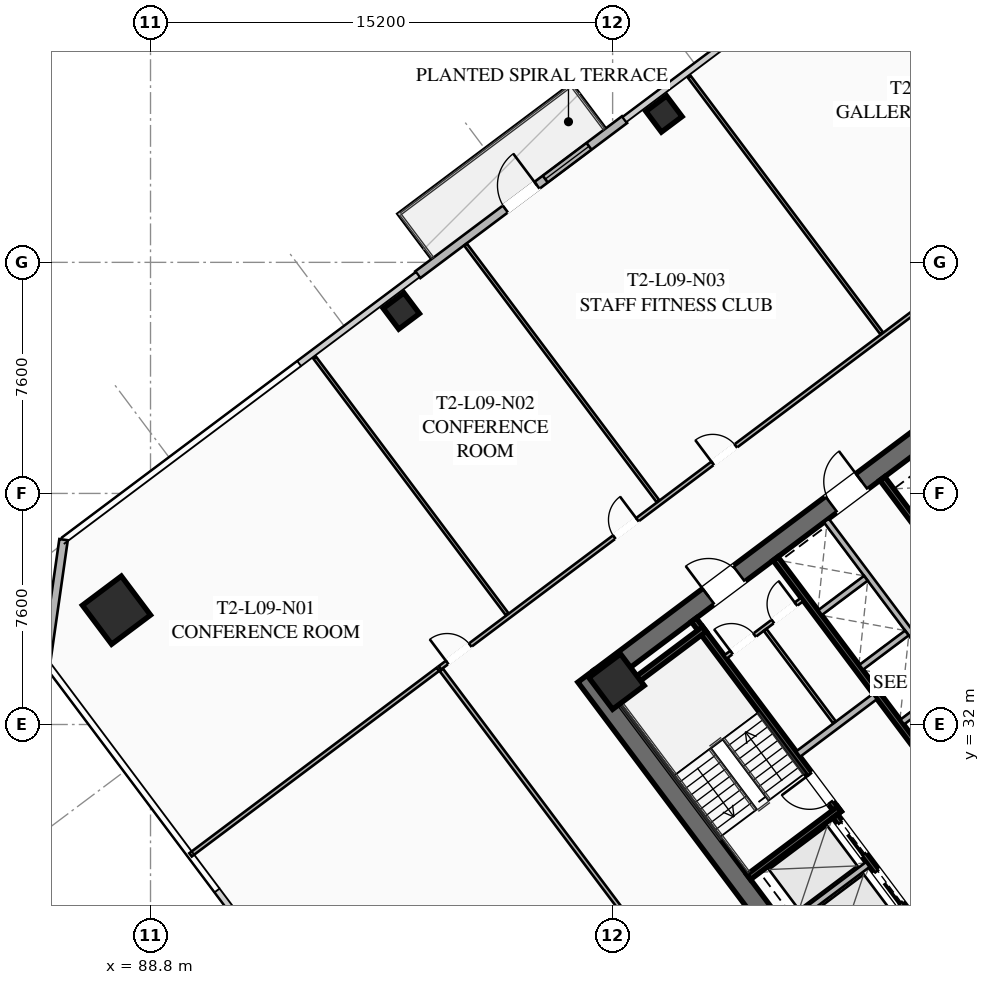
"""IFC4 building model, lengths in metres.
Left out: names, types, materials, properties, quantities, classifications, styles, units other than length and angle.
Written with IfcOpenShell. Run it as: python <this file> out.ifc"""

import sys

from ifc_helpers import new_model, si_unit, direction, frame, frame_2d, origin, origin_2d, place, context, subcontext, project, spatial, rectangle, hollow_rectangle, extrude, element, fill, save


model = new_model("IFC4")
c1 = context("Model", 3, precision=1e-05, world=origin(), true_north=direction((0.0, 1.0)))
c2 = subcontext(c1, "Body", "Model", "MODEL_VIEW")
j1 = project(units=[si_unit("LENGTHUNIT", "METRE"), si_unit("PLANEANGLEUNIT", "RADIAN")], contexts=[c1])
p1 = place(None, origin())
s1 = spatial("IfcSite", under=j1, at=p1, CompositionType="ELEMENT")
p2 = place(p1, origin())
s2 = spatial("IfcBuilding", under=s1, at=p2, CompositionType="ELEMENT")
p3 = place(p2, frame((0.0, 0.0, 38.8)))
s3 = spatial("IfcBuildingStorey", under=s2, at=p3, CompositionType="ELEMENT", Elevation=38.8)
p4 = place(p3, frame((112.476, 21.107, 0.0), z_axis=(0.0, 0.0, 1.0), x_axis=(-0.600005007985, 0.799996243986, 0.0)))
e1 = element("IfcWall", 1, at=p4, inside=s3, PredefinedType="SHEAR", context=c2, shape_type="SweptSolid", body=[
    extrude(rectangle(XDim=15.6, YDim=0.65, at=frame_2d((7.8, 0.0))), origin(), (0.0, 0.0, 1.0), 3.55),
])
p5 = place(p3, frame((124.429, 30.478, 0.0), z_axis=(0.0, 0.0, 1.0), x_axis=(-0.799998028465, -0.600002628705, 0.0)))
e2 = element("IfcWall", 2, at=p5, inside=s3, PredefinedType="SHEAR", context=c2, shape_type="SweptSolid", body=[
    extrude(rectangle(XDim=14.86, YDim=0.65, at=frame_2d((7.43, 0.0))), origin(), (0.0, 0.0, 1.0), 3.55),
])
p6 = place(p5, frame((9.13, 0.0, 0.0)))
e3 = element("IfcOpeningElement", 3, at=p6, cuts=e2, PredefinedType="OPENING", context=c2, shape_type="SweptSolid", body=[
    extrude(rectangle(XDim=1.25, YDim=2.25, at=frame_2d((0.625, 1.125))), frame((0.0, 0.335, 0.0), z_axis=(0.0, -1.0, 0.0), x_axis=(1.0, 0.0, 0.0)), (0.0, 0.0, 1.0), 0.67),
])
p7 = place(p5, frame((4.08, 0.0, 0.0)))
e4 = element("IfcOpeningElement", 4, at=p7, cuts=e2, PredefinedType="OPENING", context=c2, shape_type="SweptSolid", body=[
    extrude(rectangle(XDim=1.25, YDim=2.25, at=frame_2d((0.625, 1.125))), frame((0.0, 0.335, 0.0), z_axis=(0.0, -1.0, 0.0), x_axis=(1.0, 0.0, 0.0)), (0.0, 0.0, 1.0), 0.67),
])
p8 = place(p3, frame((103.571, 33.522, 0.0), z_axis=(0.0, 0.0, 1.0), x_axis=(0.799998028465, 0.600002628705, 0.0)))
e5 = element("IfcWall", 5, at=p8, inside=s3, PredefinedType="SHEAR", context=c2, shape_type="SweptSolid", body=[
    extrude(rectangle(XDim=14.86, YDim=0.65, at=frame_2d((7.43, 0.0))), origin(), (0.0, 0.0, 1.0), 3.55),
])
p9 = place(p8, frame((4.48, 0.0, 0.0)))
e6 = element("IfcOpeningElement", 6, at=p9, cuts=e5, PredefinedType="OPENING", context=c2, shape_type="SweptSolid", body=[
    extrude(rectangle(XDim=1.25, YDim=2.25, at=frame_2d((0.625, 1.125))), frame((0.0, 0.335, 0.0), z_axis=(0.0, -1.0, 0.0), x_axis=(1.0, 0.0, 0.0)), (0.0, 0.0, 1.0), 0.67),
])
p10 = place(p8, frame((9.53, 0.0, 0.0)))
e7 = element("IfcOpeningElement", 7, at=p10, cuts=e5, PredefinedType="OPENING", context=c2, shape_type="SweptSolid", body=[
    extrude(rectangle(XDim=1.25, YDim=2.25, at=frame_2d((0.625, 1.125))), frame((0.0, 0.335, 0.0), z_axis=(0.0, -1.0, 0.0), x_axis=(1.0, 0.0, 0.0)), (0.0, 0.0, 1.0), 0.67),
])
p11 = place(p3, frame((104.13, 33.41, 0.0), z_axis=(0.0, 0.0, 1.0), x_axis=(0.799999996291, 0.600000004945, 0.0)))
e8 = element("IfcColumn", 8, at=p11, inside=s3, PredefinedType="COLUMN", context=c2, shape_type="SweptSolid", body=[
    extrude(hollow_rectangle(XDim=1.3, YDim=1.3, WallThickness=0.05, at=origin_2d()), origin(), (0.0, 0.0, 1.0), 3.35),
])
p12 = place(p3, frame((87.68, 35.76, 0.0), z_axis=(0.0, 0.0, 1.0), x_axis=(0.799999996291, 0.600000004945, 0.0)))
e9 = element("IfcColumn", 9, at=p12, inside=s3, PredefinedType="COLUMN", context=c2, shape_type="SweptSolid", body=[
    extrude(hollow_rectangle(XDim=1.6, YDim=1.6, WallThickness=0.06, at=origin_2d()), origin(), (0.0, 0.0, 1.0), 3.35),
])
for number, where, z_axis, x_axis in (
    (10, (105.69, 52.08, 0.0), (0.0, 0.0, 1.0), (0.8, 0.6, 0.0)),
    (11, (97.05, 45.6, 0.0), (0.0, 0.0, 1.0), (0.8, 0.6, 0.0)),
):
    element("IfcColumn", number, at=place(p3, frame(where, z_axis=z_axis, x_axis=x_axis)), inside=s3, PredefinedType="COLUMN", context=c2, shape_type="SweptSolid", body=[
        extrude(hollow_rectangle(XDim=0.85, YDim=0.85, WallThickness=0.035, at=origin_2d()), origin(), (0.0, 0.0, 1.0), 3.35),
    ])
p13 = place(p3, frame((97.592, 46.794, 0.0), z_axis=(0.0, 0.0, 1.0), x_axis=(0.799996553335, 0.600004595526, 0.0)))
e12 = element("IfcWall", 12, at=p13, inside=s3, PredefinedType="SOLIDWALL", context=c2, shape_type="SweptSolid", body=[
    extrude(rectangle(XDim=8.5, YDim=0.28, at=frame_2d((4.25, 0.0))), origin(), (0.0, 0.0, 1.0), 3.35),
])
p14 = place(p13, frame((3.6, 0.0, 0.0)))
e13 = element("IfcOpeningElement", 13, at=p14, cuts=e12, PredefinedType="OPENING", context=c2, shape_type="SweptSolid", body=[
    extrude(rectangle(XDim=1.3, YDim=2.15, at=frame_2d((0.65, 1.075))), frame((0.0, 0.15, 0.0), z_axis=(0.0, -1.0, 0.0), x_axis=(1.0, 0.0, 0.0)), (0.0, 0.0, 1.0), 0.3),
])
p15 = place(p13, frame((5.24, 0.0, 0.85)))
e14 = element("IfcOpeningElement", 14, at=p15, cuts=e12, PredefinedType="OPENING", context=c2, shape_type="SweptSolid", body=[
    extrude(rectangle(XDim=1.8, YDim=1.92, at=frame_2d((0.9, 0.96))), frame((0.0, 0.15, 0.0), z_axis=(0.0, -1.0, 0.0), x_axis=(1.0, 0.0, 0.0)), (0.0, 0.0, 1.0), 0.3),
])
p16 = place(p3, frame((85.36, 34.02, 0.0), z_axis=(0.0, 0.0, 1.0), x_axis=(0.14137968631, 0.989955445613, 0.0)))
e15 = element("IfcWall", 15, at=p16, inside=s3, PredefinedType="SOLIDWALL", context=c2, shape_type="SweptSolid", body=[
    extrude(rectangle(XDim=4.101, YDim=0.28, at=frame_2d((2.051, 0.0))), origin(), (0.0, 0.0, 1.0), 3.35),
])
p17 = place(p3, frame((111.44, 29.08, 0.0), z_axis=(0.0, 0.0, 1.0), x_axis=(-0.600009827119, 0.799992629566, 0.0)))
e16 = element("IfcWall", 16, at=p17, inside=s3, PredefinedType="SHEAR", context=c2, shape_type="SweptSolid", body=[
    extrude(rectangle(XDim=7.95, YDim=0.2, at=frame_2d((3.975, 0.0))), origin(), (0.0, 0.0, 1.0), 3.35),
])
p18 = place(p17, frame((0.45, 0.0, 0.0)))
e17 = element("IfcOpeningElement", 17, at=p18, cuts=e16, PredefinedType="OPENING", context=c2, shape_type="SweptSolid", body=[
    extrude(rectangle(XDim=1.15, YDim=2.2, at=frame_2d((0.575, 1.1))), frame((0.0, 0.11, 0.0), z_axis=(0.0, -1.0, 0.0), x_axis=(1.0, 0.0, 0.0)), (0.0, 0.0, 1.0), 0.22),
])
for number, where, z_axis, x_axis in (
    (18, (108.476, 26.982, 0.0), (0.0, 0.0, 1.0), (0.8, 0.6, 0.0)),
    (19, (104.036, 32.902, 0.0), (0.0, 0.0, 1.0), (0.8, 0.6, 0.0)),
):
    element("IfcWall", number, at=place(p3, frame(where, z_axis=z_axis, x_axis=x_axis)), inside=s3, PredefinedType="SHEAR", context=c2, shape_type="SweptSolid", body=[
        extrude(rectangle(XDim=3.73, YDim=0.2, at=frame_2d((1.865, 0.0))), origin(), (0.0, 0.0, 1.0), 3.35),
    ])
p19 = place(p3, frame((117.938, 26.016, 0.0), z_axis=(0.0, 0.0, 1.0), x_axis=(-0.600005463273, 0.799995902516, 0.0)))
e20 = element("IfcWall", 20, at=p19, inside=s3, PredefinedType="SHEAR", context=c2, shape_type="SweptSolid", body=[
    extrude(rectangle(XDim=14.3, YDim=0.2, at=frame_2d((7.15, 0.0))), origin(), (0.0, 0.0, 1.0), 3.35),
])
p20 = place(p3, frame((110.104, 31.028, 0.0), z_axis=(0.0, 0.0, 1.0), x_axis=(0.800018601094, 0.59997519774, 0.0)))
e21 = element("IfcWall", 21, at=p20, inside=s3, PredefinedType="SOLIDWALL", context=c2, shape_type="SweptSolid", body=[
    extrude(rectangle(XDim=3.15, YDim=0.22, at=frame_2d((1.575, 0.0))), origin(), (0.0, 0.0, 1.0), 2.703),
])
p21 = place(p3, frame((115.13, 23.91, 0.0), z_axis=(0.0, 0.0, 1.0), x_axis=(-0.599975393228, 0.800018454488, 0.0)))
e22 = element("IfcWall", 22, at=p21, inside=s3, PredefinedType="SHEAR", context=c2, shape_type="SweptSolid", body=[
    extrude(rectangle(XDim=6.35, YDim=0.2, at=frame_2d((3.175, 0.0))), origin(), (0.0, 0.0, 1.0), 3.35),
])
p22 = place(p21, frame((4.775, 0.0, 0.0)))
e23 = element("IfcOpeningElement", 23, at=p22, cuts=e22, PredefinedType="OPENING", context=c2, shape_type="SweptSolid", body=[
    extrude(rectangle(XDim=1.3, YDim=2.25, at=frame_2d((0.65, 1.125))), frame((0.0, 0.11, 0.0), z_axis=(0.0, -1.0, 0.0), x_axis=(1.0, 0.0, 0.0)), (0.0, 0.0, 1.0), 0.22),
])
p23 = place(p21, frame((2.775, 0.0, 0.0)))
e24 = element("IfcOpeningElement", 24, at=p23, cuts=e22, PredefinedType="OPENING", context=c2, shape_type="SweptSolid", body=[
    extrude(rectangle(XDim=1.3, YDim=2.25, at=frame_2d((0.65, 1.125))), frame((0.0, 0.11, 0.0), z_axis=(0.0, -1.0, 0.0), x_axis=(1.0, 0.0, 0.0)), (0.0, 0.0, 1.0), 0.22),
])
p24 = place(p21, frame((0.575, 0.0, 0.0)))
e25 = element("IfcOpeningElement", 25, at=p24, cuts=e22, PredefinedType="OPENING", context=c2, shape_type="SweptSolid", body=[
    extrude(rectangle(XDim=1.3, YDim=2.25, at=frame_2d((0.65, 1.125))), frame((0.0, 0.11, 0.0), z_axis=(0.0, -1.0, 0.0), x_axis=(1.0, 0.0, 0.0)), (0.0, 0.0, 1.0), 0.22),
])
p25 = place(p3, frame((109.688, 25.366, 0.0), z_axis=(0.0, 0.0, 1.0), x_axis=(0.8, 0.6, 0.0)))
e26 = element("IfcWall", 26, at=p25, inside=s3, PredefinedType="SOLIDWALL", context=c2, shape_type="SweptSolid", body=[
    extrude(rectangle(XDim=3.38, YDim=0.2, at=frame_2d((1.69, 0.0))), origin(), (0.0, 0.0, 1.0), 3.35),
])
p26 = place(p3, frame((112.87, 40.09, 0.0), z_axis=(0.0, 0.0, 1.0), x_axis=(0.599975393228, -0.800018454488, 0.0)))
e27 = element("IfcWall", 27, at=p26, inside=s3, PredefinedType="SHEAR", context=c2, shape_type="SweptSolid", body=[
    extrude(rectangle(XDim=6.35, YDim=0.2, at=frame_2d((3.175, 0.0))), origin(), (0.0, 0.0, 1.0), 3.35),
])
p27 = place(p3, frame((107.71, 34.22, 0.0), z_axis=(0.0, 0.0, 1.0), x_axis=(0.799981399002, 0.60002480053, 0.0)))
e28 = element("IfcWall", 28, at=p27, inside=s3, PredefinedType="PARTITIONING", context=c2, shape_type="SweptSolid", body=[
    extrude(rectangle(XDim=3.15, YDim=0.135, at=frame_2d((1.575, 0.0))), origin(), (0.0, 0.0, 1.0), 2.703),
])
p28 = place(p27, frame((0.25, 0.0, 0.0)))
e29 = element("IfcOpeningElement", 29, at=p28, cuts=e28, PredefinedType="OPENING", context=c2, shape_type="SweptSolid", body=[
    extrude(rectangle(XDim=0.95, YDim=2.05, at=frame_2d((0.475, 1.025))), frame((0.0, 0.077, 0.0), z_axis=(0.0, -1.0, 0.0), x_axis=(1.0, 0.0, 0.0)), (0.0, 0.0, 1.0), 0.155),
])
p29 = place(p27, frame((1.95, 0.0, 0.0)))
e30 = element("IfcOpeningElement", 30, at=p29, cuts=e28, PredefinedType="OPENING", context=c2, shape_type="SweptSolid", body=[
    extrude(rectangle(XDim=0.95, YDim=2.05, at=frame_2d((0.475, 1.025))), frame((0.0, 0.077, 0.0), z_axis=(0.0, -1.0, 0.0), x_axis=(1.0, 0.0, 0.0)), (0.0, 0.0, 1.0), 0.155),
])
p30 = place(p3, frame((111.296, 32.072, 0.0), z_axis=(0.0, 0.0, 1.0), x_axis=(-0.59995887973, 0.800030838552, 0.0)))
e31 = element("IfcWall", 31, at=p30, inside=s3, PredefinedType="PARTITIONING", context=c2, shape_type="SweptSolid", body=[
    extrude(rectangle(XDim=3.8, YDim=0.11, at=frame_2d((1.9, 0.0))), origin(), (0.0, 0.0, 1.0), 2.703),
])
p31 = place(p3, frame((115.11, 33.27, 0.0), z_axis=(0.0, 0.0, 1.0), x_axis=(-0.600011488909, 0.79999138319, 0.0)))
e32 = element("IfcWall", 32, at=p31, inside=s3, PredefinedType="SOLIDWALL", context=c2, shape_type="SweptSolid", body=[
    extrude(rectangle(XDim=6.8, YDim=0.2, at=frame_2d((3.4, 0.0))), origin(), (0.0, 0.0, 1.0), 3.35),
])
p32 = place(p3, frame((113.526, 32.082, 0.0), z_axis=(0.0, 0.0, 1.0), x_axis=(0.800046745961, 0.599937666993, 0.0)))
e33 = element("IfcWall", 33, at=p32, inside=s3, PredefinedType="SOLIDWALL", context=c2, shape_type="SweptSolid", body=[
    extrude(rectangle(XDim=1.88, YDim=0.2, at=frame_2d((0.94, 0.0))), origin(), (0.0, 0.0, 1.0), 3.35),
])
p33 = place(p3, frame((112.176, 33.882, 0.0), z_axis=(0.0, 0.0, 1.0), x_axis=(0.8, 0.6, 0.0)))
e34 = element("IfcWall", 34, at=p33, inside=s3, PredefinedType="SOLIDWALL", context=c2, shape_type="SweptSolid", body=[
    extrude(rectangle(XDim=1.88, YDim=0.2, at=frame_2d((0.94, 0.0))), origin(), (0.0, 0.0, 1.0), 3.35),
])
p34 = place(p3, frame((110.826, 35.682, 0.0), z_axis=(0.0, 0.0, 1.0), x_axis=(0.799984418148, 0.600020775241, 0.0)))
e35 = element("IfcWall", 35, at=p34, inside=s3, PredefinedType="SOLIDWALL", context=c2, shape_type="SweptSolid", body=[
    extrude(rectangle(XDim=1.88, YDim=0.2, at=frame_2d((0.94, 0.0))), origin(), (0.0, 0.0, 1.0), 3.35),
])
p35 = place(p3, frame((98.316, 33.862, 0.0), z_axis=(0.0, 0.0, 1.0), x_axis=(0.800001947934, 0.599997402746, 0.0)))
e36 = element("IfcWall", 36, at=p35, inside=s3, PredefinedType="PARTITIONING", context=c2, shape_type="SweptSolid", body=[
    extrude(rectangle(XDim=30.08, YDim=0.135, at=frame_2d((15.04, 0.0))), origin(), (0.0, 0.0, 1.0), 2.703),
])
p36 = place(p35, frame((0.3, 0.0, 0.0)))
e37 = element("IfcOpeningElement", 37, at=p36, cuts=e36, PredefinedType="OPENING", context=c2, shape_type="SweptSolid", body=[
    extrude(rectangle(XDim=0.95, YDim=2.05, at=frame_2d((0.475, 1.025))), frame((0.0, 0.077, 0.0), z_axis=(0.0, -1.0, 0.0), x_axis=(1.0, 0.0, 0.0)), (0.0, 0.0, 1.0), 0.155),
])
p37 = place(p35, frame((7.172, 0.0, 0.0)))
e38 = element("IfcOpeningElement", 38, at=p37, cuts=e36, PredefinedType="OPENING", context=c2, shape_type="SweptSolid", body=[
    extrude(rectangle(XDim=0.95, YDim=2.05, at=frame_2d((0.475, 1.025))), frame((0.0, 0.077, 0.0), z_axis=(0.0, -1.0, 0.0), x_axis=(1.0, 0.0, 0.0)), (0.0, 0.0, 1.0), 0.155),
])
p38 = place(p35, frame((11.218, 0.0, 0.0)))
e39 = element("IfcOpeningElement", 39, at=p38, cuts=e36, PredefinedType="OPENING", context=c2, shape_type="SweptSolid", body=[
    extrude(rectangle(XDim=0.95, YDim=2.05, at=frame_2d((0.475, 1.025))), frame((0.0, 0.077, 0.0), z_axis=(0.0, -1.0, 0.0), x_axis=(1.0, 0.0, 0.0)), (0.0, 0.0, 1.0), 0.155),
])
p39 = place(p35, frame((28.83, 0.0, 0.0)))
e40 = element("IfcOpeningElement", 40, at=p39, cuts=e36, PredefinedType="OPENING", context=c2, shape_type="SweptSolid", body=[
    extrude(rectangle(XDim=0.95, YDim=2.05, at=frame_2d((0.475, 1.025))), frame((0.0, 0.077, 0.0), z_axis=(0.0, -1.0, 0.0), x_axis=(1.0, 0.0, 0.0)), (0.0, 0.0, 1.0), 0.155),
])
p40 = place(p3, frame((100.532, 35.624, 0.0), z_axis=(0.0, 0.0, 1.0), x_axis=(-0.600007405188, 0.799994446056, 0.0)))
e41 = element("IfcWall", 41, at=p40, inside=s3, PredefinedType="PARTITIONING", context=c2, shape_type="SweptSolid", body=[
    extrude(rectangle(XDim=10.55, YDim=0.11, at=frame_2d((5.275, 0.0))), origin(), (0.0, 0.0, 1.0), 2.703),
])
p41 = place(p3, frame((105.492, 39.344, 0.0), z_axis=(0.0, 0.0, 1.0), x_axis=(-0.599992594658, 0.800005553953, 0.0)))
e42 = element("IfcWall", 42, at=p41, inside=s3, PredefinedType="PARTITIONING", context=c2, shape_type="SweptSolid", body=[
    extrude(rectangle(XDim=10.55, YDim=0.11, at=frame_2d((5.275, 0.0))), origin(), (0.0, 0.0, 1.0), 2.703),
])
p42 = place(p3, frame((112.852, 44.864, 0.0), z_axis=(0.0, 0.0, 1.0), x_axis=(-0.600007405188, 0.799994446056, 0.0)))
e43 = element("IfcWall", 43, at=p42, inside=s3, PredefinedType="PARTITIONING", context=c2, shape_type="SweptSolid", body=[
    extrude(rectangle(XDim=10.55, YDim=0.11, at=frame_2d((5.275, 0.0))), origin(), (0.0, 0.0, 1.0), 2.703),
])
p43 = place(p3, frame((135.55, 34.35, 0.0), z_axis=(0.0, 0.0, 1.0), x_axis=(-0.799998052067, -0.600002597235, 0.0)))
e44 = element("IfcWall", 44, at=p43, inside=s3, PredefinedType="PARTITIONING", context=c2, shape_type="SweptSolid", body=[
    extrude(rectangle(XDim=30.08, YDim=0.135, at=frame_2d((15.04, 0.0))), origin(), (0.0, 0.0, 1.0), 2.703),
])
p44 = place(p43, frame((28.75, 0.0, 0.0)))
e45 = element("IfcOpeningElement", 45, at=p44, cuts=e44, PredefinedType="OPENING", context=c2, shape_type="SweptSolid", body=[
    extrude(rectangle(XDim=0.95, YDim=2.05, at=frame_2d((0.475, 1.025))), frame((0.0, 0.077, 0.0), z_axis=(0.0, -1.0, 0.0), x_axis=(1.0, 0.0, 0.0)), (0.0, 0.0, 1.0), 0.155),
])
p45 = place(p43, frame((21.999, 0.0, 0.0)))
e46 = element("IfcOpeningElement", 46, at=p45, cuts=e44, PredefinedType="OPENING", context=c2, shape_type="SweptSolid", body=[
    extrude(rectangle(XDim=0.95, YDim=2.05, at=frame_2d((0.475, 1.025))), frame((0.0, 0.077, 0.0), z_axis=(0.0, -1.0, 0.0), x_axis=(1.0, 0.0, 0.0)), (0.0, 0.0, 1.0), 0.155),
])
p46 = place(p43, frame((17.939, 0.0, 0.0)))
e47 = element("IfcOpeningElement", 47, at=p46, cuts=e44, PredefinedType="OPENING", context=c2, shape_type="SweptSolid", body=[
    extrude(rectangle(XDim=0.95, YDim=2.05, at=frame_2d((0.475, 1.025))), frame((0.0, 0.077, 0.0), z_axis=(0.0, -1.0, 0.0), x_axis=(1.0, 0.0, 0.0)), (0.0, 0.0, 1.0), 0.155),
])
p47 = place(p43, frame((0.38, 0.0, 0.0)))
e48 = element("IfcOpeningElement", 48, at=p47, cuts=e44, PredefinedType="OPENING", context=c2, shape_type="SweptSolid", body=[
    extrude(rectangle(XDim=0.95, YDim=2.05, at=frame_2d((0.475, 1.025))), frame((0.0, 0.077, 0.0), z_axis=(0.0, -1.0, 0.0), x_axis=(1.0, 0.0, 0.0)), (0.0, 0.0, 1.0), 0.155),
])
p48 = place(p3, frame((111.438, 16.366, 0.0), z_axis=(0.0, 0.0, 1.0), x_axis=(-0.599996414648, 0.800002689001, 0.0)))
e49 = element("IfcWall", 49, at=p48, inside=s3, PredefinedType="PARTITIONING", context=c2, shape_type="SweptSolid", body=[
    extrude(rectangle(XDim=21.79, YDim=0.135, at=frame_2d((10.895, 0.0))), origin(), (0.0, 0.0, 1.0), 2.703),
])
p49 = place(p48, frame((0.3, 0.0, 0.0)))
e50 = element("IfcOpeningElement", 50, at=p49, cuts=e49, PredefinedType="OPENING", context=c2, shape_type="SweptSolid", body=[
    extrude(rectangle(XDim=0.95, YDim=2.05, at=frame_2d((0.475, 1.025))), frame((0.0, 0.077, 0.0), z_axis=(0.0, -1.0, 0.0), x_axis=(1.0, 0.0, 0.0)), (0.0, 0.0, 1.0), 0.155),
])
p50 = place(p3, frame((98.252, 33.814, 0.0), z_axis=(0.0, 0.0, 1.0), x_axis=(-0.799997119281, -0.600003840939, 0.0)))
e51 = element("IfcWall", 51, at=p50, inside=s3, PredefinedType="PARTITIONING", context=c2, shape_type="SweptSolid", body=[
    extrude(rectangle(XDim=10.17, YDim=0.135, at=frame_2d((5.085, 0.0))), origin(), (0.0, 0.0, 1.0), 2.703),
])
p51 = place(p14, origin())
e52 = element("IfcDoor", 52, at=p51, inside=s3, OperationType="SINGLE_SWING_RIGHT", PredefinedType="DOOR", context=c2, shape_type="SweptSolid", body=[
    extrude(rectangle(XDim=1.3, YDim=2.15, at=frame_2d((0.65, 1.075))), frame((0.0, 0.025, 0.0), z_axis=(0.0, -1.0, 0.0), x_axis=(1.0, 0.0, 0.0)), (0.0, 0.0, 1.0), 0.05),
])
fill(e13, e52)
p52 = place(p15, origin())
e53 = element("IfcWindow", 53, at=p52, inside=s3, PartitioningType="SINGLE_PANEL", PredefinedType="WINDOW", context=c2, shape_type="SweptSolid", body=[
    extrude(rectangle(XDim=1.8, YDim=1.92, at=frame_2d((0.9, 0.96))), frame((0.0, 0.03, 0.0), z_axis=(0.0, -1.0, 0.0), x_axis=(1.0, 0.0, 0.0)), (0.0, 0.0, 1.0), 0.06),
])
fill(e14, e53)
p53 = place(p9, origin())
e54 = element("IfcDoor", 54, at=p53, inside=s3, OperationType="SINGLE_SWING_LEFT", PredefinedType="DOOR", context=c2, shape_type="SweptSolid", body=[
    extrude(rectangle(XDim=1.25, YDim=2.25, at=frame_2d((0.625, 1.125))), frame((0.0, 0.025, 0.0), z_axis=(0.0, -1.0, 0.0), x_axis=(1.0, 0.0, 0.0)), (0.0, 0.0, 1.0), 0.05),
])
fill(e6, e54)
p54 = place(p10, origin())
e55 = element("IfcDoor", 55, at=p54, inside=s3, OperationType="SINGLE_SWING_RIGHT", PredefinedType="DOOR", context=c2, shape_type="SweptSolid", body=[
    extrude(rectangle(XDim=1.25, YDim=2.25, at=frame_2d((0.625, 1.125))), frame((0.0, 0.025, 0.0), z_axis=(0.0, -1.0, 0.0), x_axis=(1.0, 0.0, 0.0)), (0.0, 0.0, 1.0), 0.05),
])
fill(e7, e55)
p55 = place(p18, origin())
e56 = element("IfcDoor", 56, at=p55, inside=s3, OperationType="SINGLE_SWING_RIGHT", PredefinedType="DOOR", context=c2, shape_type="SweptSolid", body=[
    extrude(rectangle(XDim=1.15, YDim=2.2, at=frame_2d((0.575, 1.1))), frame((0.0, 0.025, 0.0), z_axis=(0.0, -1.0, 0.0), x_axis=(1.0, 0.0, 0.0)), (0.0, 0.0, 1.0), 0.05),
])
fill(e17, e56)
p56 = place(p28, origin())
e57 = element("IfcDoor", 57, at=p56, inside=s3, OperationType="SINGLE_SWING_LEFT", PredefinedType="DOOR", context=c2, shape_type="SweptSolid", body=[
    extrude(rectangle(XDim=0.95, YDim=2.05, at=frame_2d((0.475, 1.025))), frame((0.0, 0.025, 0.0), z_axis=(0.0, -1.0, 0.0), x_axis=(1.0, 0.0, 0.0)), (0.0, 0.0, 1.0), 0.05),
])
fill(e29, e57)
p57 = place(p29, origin())
e58 = element("IfcDoor", 58, at=p57, inside=s3, OperationType="SINGLE_SWING_RIGHT", PredefinedType="DOOR", context=c2, shape_type="SweptSolid", body=[
    extrude(rectangle(XDim=0.95, YDim=2.05, at=frame_2d((0.475, 1.025))), frame((0.0, 0.025, 0.0), z_axis=(0.0, -1.0, 0.0), x_axis=(1.0, 0.0, 0.0)), (0.0, 0.0, 1.0), 0.05),
])
fill(e30, e58)
p58 = place(p36, origin())
e59 = element("IfcDoor", 59, at=p58, inside=s3, OperationType="SINGLE_SWING_LEFT", PredefinedType="DOOR", context=c2, shape_type="SweptSolid", body=[
    extrude(rectangle(XDim=0.95, YDim=2.05, at=frame_2d((0.475, 1.025))), frame((0.0, 0.025, 0.0), z_axis=(0.0, -1.0, 0.0), x_axis=(1.0, 0.0, 0.0)), (0.0, 0.0, 1.0), 0.05),
])
fill(e37, e59)
p59 = place(p37, origin())
e60 = element("IfcDoor", 60, at=p59, inside=s3, OperationType="SINGLE_SWING_RIGHT", PredefinedType="DOOR", context=c2, shape_type="SweptSolid", body=[
    extrude(rectangle(XDim=0.95, YDim=2.05, at=frame_2d((0.475, 1.025))), frame((0.0, 0.025, 0.0), z_axis=(0.0, -1.0, 0.0), x_axis=(1.0, 0.0, 0.0)), (0.0, 0.0, 1.0), 0.05),
])
fill(e38, e60)
p60 = place(p38, origin())
e61 = element("IfcDoor", 61, at=p60, inside=s3, OperationType="SINGLE_SWING_LEFT", PredefinedType="DOOR", context=c2, shape_type="SweptSolid", body=[
    extrude(rectangle(XDim=0.95, YDim=2.05, at=frame_2d((0.475, 1.025))), frame((0.0, 0.025, 0.0), z_axis=(0.0, -1.0, 0.0), x_axis=(1.0, 0.0, 0.0)), (0.0, 0.0, 1.0), 0.05),
])
fill(e39, e61)
p61 = place(p22, origin())
e62 = element("IfcDoor", 62, at=p61, inside=s3, OperationType="SLIDING_TO_LEFT", PredefinedType="DOOR", context=c2, shape_type="SweptSolid", body=[
    extrude(rectangle(XDim=1.3, YDim=2.25, at=frame_2d((0.65, 1.125))), frame((0.0, 0.025, 0.0), z_axis=(0.0, -1.0, 0.0), x_axis=(1.0, 0.0, 0.0)), (0.0, 0.0, 1.0), 0.05),
])
fill(e23, e62)
p62 = place(p23, origin())
e63 = element("IfcDoor", 63, at=p62, inside=s3, OperationType="SLIDING_TO_LEFT", PredefinedType="DOOR", context=c2, shape_type="SweptSolid", body=[
    extrude(rectangle(XDim=1.3, YDim=2.25, at=frame_2d((0.65, 1.125))), frame((0.0, 0.025, 0.0), z_axis=(0.0, -1.0, 0.0), x_axis=(1.0, 0.0, 0.0)), (0.0, 0.0, 1.0), 0.05),
])
fill(e24, e63)
save(model, sys.argv[1])
